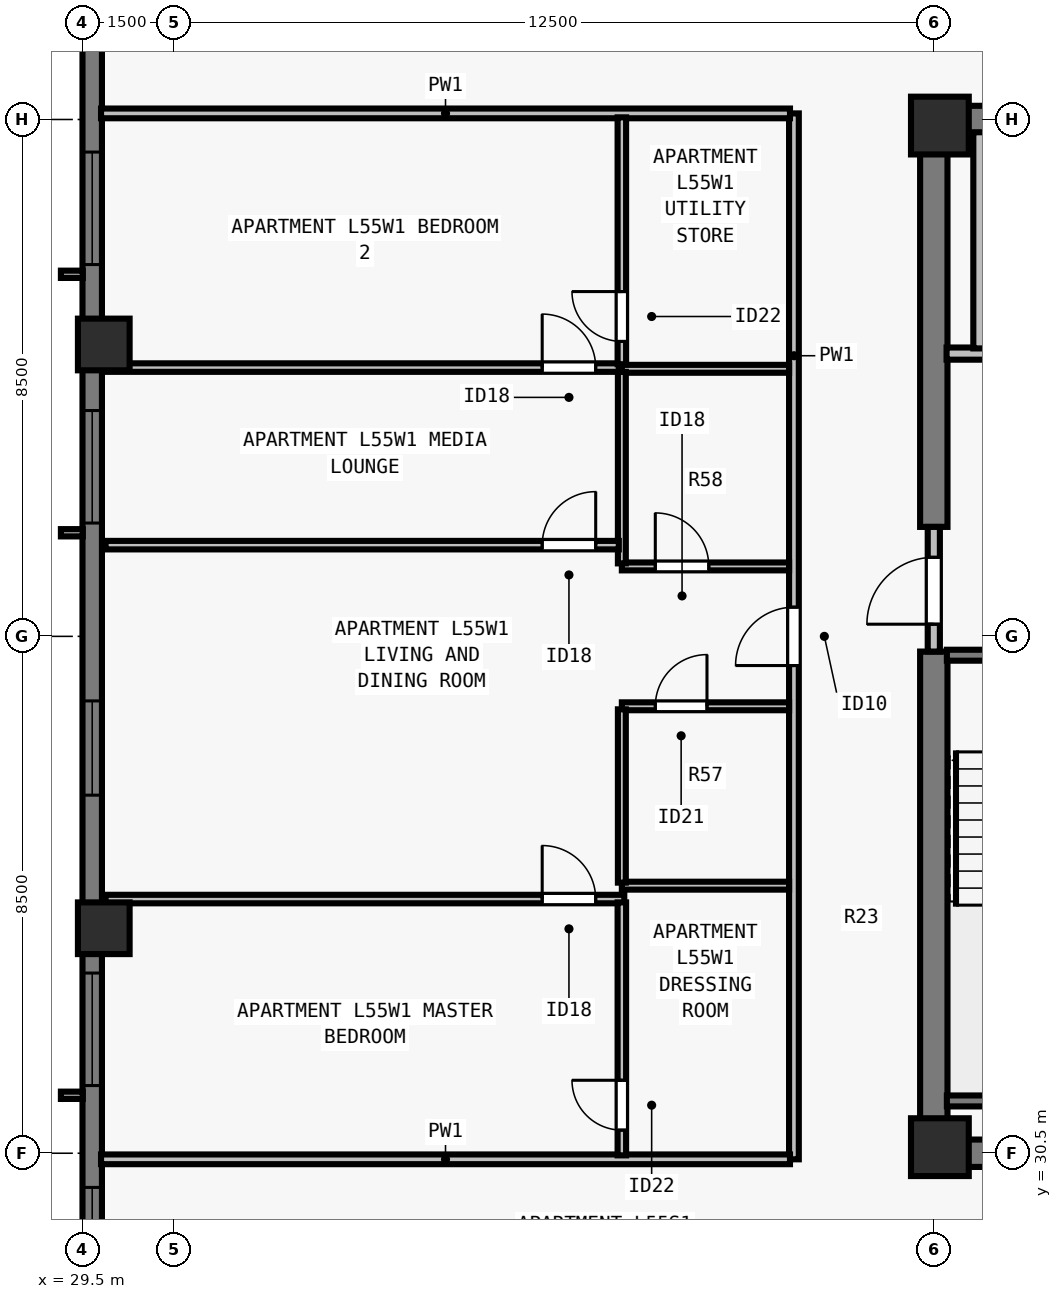
"""IFC4 building model, lengths in metres.
Left out: names, types, materials, properties, quantities, classifications, styles, units other than length and angle.
Written with IfcOpenShell. Run it as: python <this file> out.ifc"""

import sys

from ifc_helpers import new_model, si_unit, direction, frame, frame_2d, origin, origin_2d, place, context, subcontext, project, spatial, rectangle, extrude, element, fill, save


model = new_model("IFC4")
c1 = context("Model", 3, precision=1e-05, world=origin(), true_north=direction((0.0, 1.0)))
c2 = subcontext(c1, "Body", "Model", "MODEL_VIEW")
j1 = project(units=[si_unit("LENGTHUNIT", "METRE"), si_unit("PLANEANGLEUNIT", "RADIAN")], contexts=[c1])
p1 = place(None, origin())
s1 = spatial("IfcSite", under=j1, at=p1, CompositionType="ELEMENT")
p2 = place(p1, origin())
s2 = spatial("IfcBuilding", under=s1, at=p2, CompositionType="ELEMENT")
p3 = place(p2, frame((0.0, 0.0, 202.5)))
s3 = spatial("IfcBuildingStorey", under=s2, at=p3, CompositionType="ELEMENT", Elevation=202.5)
for number, where, z_axis, x_axis in (
    (1, (43.6, 30.6, 0.0), (0.0, 0.0, 1.0), (1.0, 0.0, 0.0)),
    (2, (43.6, 47.4, 0.0), (0.0, 0.0, 1.0), (1.0, 0.0, 0.0)),
):
    element("IfcColumn", number, at=place(p3, frame(where, z_axis=z_axis, x_axis=x_axis)), inside=s3, PredefinedType="COLUMN", context=c2, shape_type="SweptSolid", body=[
        extrude(rectangle(XDim=0.95, YDim=0.95, at=origin_2d()), origin(), (0.0, 0.0, 1.0), 3.5),
    ])
for number, where, z_axis, x_axis in (
    (3, (29.85, 43.8, 0.0), (0.0, 0.0, 1.0), (0.0, 1.0, 0.0)),
    (4, (29.85, 34.2, 0.0), (0.0, 0.0, 1.0), (0.0, 1.0, 0.0)),
):
    element("IfcColumn", number, at=place(p3, frame(where, z_axis=z_axis, x_axis=x_axis)), inside=s3, PredefinedType="COLUMN", context=c2, shape_type="SweptSolid", body=[
        extrude(rectangle(XDim=0.85, YDim=0.85, at=origin_2d()), origin(), (0.0, 0.0, 1.0), 3.5),
    ])
p4 = place(p3, frame((29.66, 21.5, 0.0), z_axis=(0.0, 0.0, 1.0), x_axis=(0.0, 1.0, 0.0)))
e5 = element("IfcWall", 5, at=p4, inside=s3, PredefinedType="SOLIDWALL", context=c2, shape_type="SweptSolid", body=[
    extrude(rectangle(XDim=34.702, YDim=0.32, at=frame_2d((17.351, 0.0))), origin(), (0.0, 0.0, 1.0), 3.29),
])
p5 = place(p4, frame((4.163, 0.0, 0.8)))
e6 = element("IfcOpeningElement", 6, at=p5, cuts=e5, PredefinedType="OPENING", context=c2, shape_type="SweptSolid", body=[
    extrude(rectangle(XDim=1.85, YDim=1.678, at=frame_2d((0.925, 0.839))), frame((0.0, 0.17, 0.0), z_axis=(0.0, -1.0, 0.0), x_axis=(1.0, 0.0, 0.0)), (0.0, 0.0, 1.0), 0.34),
])
p6 = place(p4, frame((6.888, 0.0, 0.8)))
e7 = element("IfcOpeningElement", 7, at=p6, cuts=e5, PredefinedType="OPENING", context=c2, shape_type="SweptSolid", body=[
    extrude(rectangle(XDim=1.55, YDim=1.678, at=frame_2d((0.775, 0.839))), frame((0.0, 0.17, 0.0), z_axis=(0.0, -1.0, 0.0), x_axis=(1.0, 0.0, 0.0)), (0.0, 0.0, 1.0), 0.34),
])
p7 = place(p4, frame((10.113, 0.0, 0.8)))
e8 = element("IfcOpeningElement", 8, at=p7, cuts=e5, PredefinedType="OPENING", context=c2, shape_type="SweptSolid", body=[
    extrude(rectangle(XDim=1.85, YDim=1.678, at=frame_2d((0.925, 0.839))), frame((0.0, 0.17, 0.0), z_axis=(0.0, -1.0, 0.0), x_axis=(1.0, 0.0, 0.0)), (0.0, 0.0, 1.0), 0.34),
])
p8 = place(p4, frame((14.888, 0.0, 0.8)))
e9 = element("IfcOpeningElement", 9, at=p8, cuts=e5, PredefinedType="OPENING", context=c2, shape_type="SweptSolid", body=[
    extrude(rectangle(XDim=1.55, YDim=1.678, at=frame_2d((0.775, 0.839))), frame((0.0, 0.17, 0.0), z_axis=(0.0, -1.0, 0.0), x_axis=(1.0, 0.0, 0.0)), (0.0, 0.0, 1.0), 0.34),
])
p9 = place(p4, frame((19.364, 0.0, 0.8)))
e10 = element("IfcOpeningElement", 10, at=p9, cuts=e5, PredefinedType="OPENING", context=c2, shape_type="SweptSolid", body=[
    extrude(rectangle(XDim=1.85, YDim=1.678, at=frame_2d((0.925, 0.839))), frame((0.0, 0.17, 0.0), z_axis=(0.0, -1.0, 0.0), x_axis=(1.0, 0.0, 0.0)), (0.0, 0.0, 1.0), 0.34),
])
p10 = place(p4, frame((23.614, 0.0, 0.8)))
e11 = element("IfcOpeningElement", 11, at=p10, cuts=e5, PredefinedType="OPENING", context=c2, shape_type="SweptSolid", body=[
    extrude(rectangle(XDim=1.85, YDim=1.678, at=frame_2d((0.925, 0.839))), frame((0.0, 0.17, 0.0), z_axis=(0.0, -1.0, 0.0), x_axis=(1.0, 0.0, 0.0)), (0.0, 0.0, 1.0), 0.34),
])
p11 = place(p4, frame((28.839, 0.0, 0.8)))
e12 = element("IfcOpeningElement", 12, at=p11, cuts=e5, PredefinedType="OPENING", context=c2, shape_type="SweptSolid", body=[
    extrude(rectangle(XDim=1.55, YDim=1.678, at=frame_2d((0.775, 0.839))), frame((0.0, 0.17, 0.0), z_axis=(0.0, -1.0, 0.0), x_axis=(1.0, 0.0, 0.0)), (0.0, 0.0, 1.0), 0.34),
])
for number, where, z_axis, x_axis in (
    (13, (43.275, 30.5, 0.0), (0.0, 0.0, 1.0), (1.0, 0.0, 0.0)),
    (14, (43.275, 47.5, 0.0), (0.0, 0.0, 1.0), (1.0, 0.0, 0.0)),
):
    element("IfcWall", number, at=place(p3, frame(where, z_axis=z_axis, x_axis=x_axis)), inside=s3, PredefinedType="SHEAR", context=c2, shape_type="SweptSolid", body=[
        extrude(rectangle(XDim=17.45, YDim=0.45, at=frame_2d((8.725, 0.0))), origin(), (0.0, 0.0, 1.0), 3.29),
    ])
p12 = place(p3, frame((43.5, 30.715, 0.0), z_axis=(0.0, 0.0, 1.0), x_axis=(0.0, 1.0, 0.0)))
e15 = element("IfcWall", 15, at=p12, inside=s3, PredefinedType="SHEAR", context=c2, shape_type="SweptSolid", body=[
    extrude(rectangle(XDim=8.035, YDim=0.45, at=frame_2d((4.018, 0.0))), origin(), (0.0, 0.0, 1.0), 3.29),
])
p13 = place(p3, frame((43.5, 40.8, 0.0), z_axis=(0.0, 0.0, 1.0), x_axis=(0.0, 1.0, 0.0)))
e16 = element("IfcWall", 16, at=p13, inside=s3, PredefinedType="SHEAR", context=c2, shape_type="SweptSolid", body=[
    extrude(rectangle(XDim=6.485, YDim=0.45, at=frame_2d((3.242, 0.0))), origin(), (0.0, 0.0, 1.0), 3.29),
])
p14 = place(p3, frame((43.5, 38.75, 0.0), z_axis=(0.0, 0.0, 1.0), x_axis=(0.0, 1.0, 0.0)))
e17 = element("IfcWall", 17, at=p14, inside=s3, PredefinedType="SOLIDWALL", context=c2, shape_type="SweptSolid", body=[
    extrude(rectangle(XDim=2.05, YDim=0.2, at=frame_2d((1.025, 0.0))), origin(), (0.0, 0.0, 1.0), 3.29),
])
p15 = place(p14, frame((0.45, 0.0, 0.0)))
e18 = element("IfcOpeningElement", 18, at=p15, cuts=e17, PredefinedType="OPENING", context=c2, shape_type="SweptSolid", body=[
    extrude(rectangle(XDim=1.1, YDim=2.15, at=frame_2d((0.55, 1.075))), frame((0.0, 0.11, 0.0), z_axis=(0.0, -1.0, 0.0), x_axis=(1.0, 0.0, 0.0)), (0.0, 0.0, 1.0), 0.22),
])
p16 = place(p3, frame((43.71, 43.65, 0.0), z_axis=(0.0, 0.0, 1.0), x_axis=(1.0, 0.0, 0.0)))
e19 = element("IfcWall", 19, at=p16, inside=s3, PredefinedType="SOLIDWALL", context=c2, shape_type="SweptSolid", body=[
    extrude(rectangle(XDim=3.555, YDim=0.2, at=frame_2d((1.777, 0.0))), origin(), (0.0, 0.0, 1.0), 3.29),
])
p17 = place(p16, frame((1.16, 0.0, 0.0)))
e20 = element("IfcOpeningElement", 20, at=p17, cuts=e19, PredefinedType="OPENING", context=c2, shape_type="SweptSolid", body=[
    extrude(rectangle(XDim=1.1, YDim=2.2, at=frame_2d((0.55, 1.1))), frame((0.0, 0.11, 0.0), z_axis=(0.0, -1.0, 0.0), x_axis=(1.0, 0.0, 0.0)), (0.0, 0.0, 1.0), 0.22),
])
p18 = place(p3, frame((44.25, 43.735, 0.0), z_axis=(0.0, 0.0, 1.0), x_axis=(0.0, 1.0, 0.0)))
e21 = element("IfcWall", 21, at=p18, inside=s3, PredefinedType="SOLIDWALL", context=c2, shape_type="SweptSolid", body=[
    extrude(rectangle(XDim=3.555, YDim=0.2, at=frame_2d((1.777, 0.0))), origin(), (0.0, 0.0, 1.0), 3.29),
])
p19 = place(p3, frame((41.2, 30.4, 0.0), z_axis=(0.0, 0.0, 1.0), x_axis=(0.0, 1.0, 0.0)))
e22 = element("IfcWall", 22, at=p19, inside=s3, PredefinedType="PARTITIONING", context=c2, shape_type="SweptSolid", body=[
    extrude(rectangle(XDim=17.2, YDim=0.16, at=frame_2d((8.6, 0.0))), origin(), (0.0, 0.0, 1.0), 3.29),
])
p20 = place(p19, frame((8.12, 0.0, 0.0)))
e23 = element("IfcOpeningElement", 23, at=p20, cuts=e22, PredefinedType="OPENING", context=c2, shape_type="SweptSolid", body=[
    extrude(rectangle(XDim=0.96, YDim=2.18, at=frame_2d((0.48, 1.09))), frame((0.0, 0.09, 0.0), z_axis=(0.0, -1.0, 0.0), x_axis=(1.0, 0.0, 0.0)), (0.0, 0.0, 1.0), 0.18),
])
for number, where, z_axis, x_axis in (
    (24, (29.805, 30.4, 0.0), (0.0, 0.0, 1.0), (1.0, 0.0, 0.0)),
    (25, (29.805, 47.6, 0.0), (0.0, 0.0, 1.0), (1.0, 0.0, 0.0)),
):
    element("IfcWall", number, at=place(p3, frame(where, z_axis=z_axis, x_axis=x_axis)), inside=s3, PredefinedType="PARTITIONING", context=c2, shape_type="SweptSolid", body=[
        extrude(rectangle(XDim=11.33, YDim=0.16, at=frame_2d((5.665, 0.0))), origin(), (0.0, 0.0, 1.0), 3.29),
    ])
p21 = place(p3, frame((38.37, 34.9, 0.0), z_axis=(0.0, 0.0, 1.0), x_axis=(1.0, 0.0, 0.0)))
e26 = element("IfcWall", 26, at=p21, inside=s3, PredefinedType="PLUMBINGWALL", context=c2, shape_type="SweptSolid", body=[
    extrude(rectangle(XDim=2.75, YDim=0.13, at=frame_2d((1.375, 0.0))), origin(), (0.0, 0.0, 1.0), 3.29),
])
p22 = place(p3, frame((38.37, 37.85, 0.0), z_axis=(0.0, 0.0, 1.0), x_axis=(1.0, 0.0, 0.0)))
e27 = element("IfcWall", 27, at=p22, inside=s3, PredefinedType="PLUMBINGWALL", context=c2, shape_type="SweptSolid", body=[
    extrude(rectangle(XDim=2.75, YDim=0.13, at=frame_2d((1.375, 0.0))), origin(), (0.0, 0.0, 1.0), 3.29),
])
p23 = place(p22, frame((0.55, 0.0, 0.0)))
e28 = element("IfcOpeningElement", 28, at=p23, cuts=e27, PredefinedType="OPENING", context=c2, shape_type="SweptSolid", body=[
    extrude(rectangle(XDim=0.85, YDim=2.08, at=frame_2d((0.425, 1.04))), frame((0.0, 0.075, 0.0), z_axis=(0.0, -1.0, 0.0), x_axis=(1.0, 0.0, 0.0)), (0.0, 0.0, 1.0), 0.15),
])
p24 = place(p3, frame((38.37, 34.95, 0.0), z_axis=(0.0, 0.0, 1.0), x_axis=(0.0, 1.0, 0.0)))
e29 = element("IfcWall", 29, at=p24, inside=s3, PredefinedType="PLUMBINGWALL", context=c2, shape_type="SweptSolid", body=[
    extrude(rectangle(XDim=2.85, YDim=0.13, at=frame_2d((1.425, 0.0))), origin(), (0.0, 0.0, 1.0), 3.29),
])
p25 = place(p3, frame((38.37, 43.4, 0.0), z_axis=(0.0, 0.0, 1.0), x_axis=(1.0, 0.0, 0.0)))
e30 = element("IfcWall", 30, at=p25, inside=s3, PredefinedType="PLUMBINGWALL", context=c2, shape_type="SweptSolid", body=[
    extrude(rectangle(XDim=2.75, YDim=0.13, at=frame_2d((1.375, 0.0))), origin(), (0.0, 0.0, 1.0), 2.958),
])
p26 = place(p3, frame((38.37, 40.15, 0.0), z_axis=(0.0, 0.0, 1.0), x_axis=(1.0, 0.0, 0.0)))
e31 = element("IfcWall", 31, at=p26, inside=s3, PredefinedType="PLUMBINGWALL", context=c2, shape_type="SweptSolid", body=[
    extrude(rectangle(XDim=2.75, YDim=0.13, at=frame_2d((1.375, 0.0))), origin(), (0.0, 0.0, 1.0), 3.29),
])
p27 = place(p26, frame((0.55, 0.0, 0.0)))
e32 = element("IfcOpeningElement", 32, at=p27, cuts=e31, PredefinedType="OPENING", context=c2, shape_type="SweptSolid", body=[
    extrude(rectangle(XDim=0.88, YDim=2.1, at=frame_2d((0.44, 1.05))), frame((0.0, 0.075, 0.0), z_axis=(0.0, -1.0, 0.0), x_axis=(1.0, 0.0, 0.0)), (0.0, 0.0, 1.0), 0.15),
])
p28 = place(p3, frame((38.37, 40.2, 0.0), z_axis=(0.0, 0.0, 1.0), x_axis=(0.0, 1.0, 0.0)))
e33 = element("IfcWall", 33, at=p28, inside=s3, PredefinedType="PLUMBINGWALL", context=c2, shape_type="SweptSolid", body=[
    extrude(rectangle(XDim=3.15, YDim=0.13, at=frame_2d((1.575, 0.0))), origin(), (0.0, 0.0, 1.0), 3.29),
])
p29 = place(p3, frame((29.88, 34.68, 0.0), z_axis=(0.0, 0.0, 1.0), x_axis=(1.0, 0.0, 0.0)))
e34 = element("IfcWall", 34, at=p29, inside=s3, PredefinedType="PARTITIONING", context=c2, shape_type="SweptSolid", body=[
    extrude(rectangle(XDim=8.53, YDim=0.14, at=frame_2d((4.265, 0.0))), origin(), (0.0, 0.0, 1.0), 2.958),
])
p30 = place(p29, frame((7.18, 0.0, 0.0)))
e35 = element("IfcOpeningElement", 35, at=p30, cuts=e34, PredefinedType="OPENING", context=c2, shape_type="SweptSolid", body=[
    extrude(rectangle(XDim=0.88, YDim=2.1, at=frame_2d((0.44, 1.05))), frame((0.0, 0.08, 0.0), z_axis=(0.0, -1.0, 0.0), x_axis=(1.0, 0.0, 0.0)), (0.0, 0.0, 1.0), 0.16),
])
p31 = place(p3, frame((38.37, 30.465, 0.0), z_axis=(0.0, 0.0, 1.0), x_axis=(0.0, 1.0, 0.0)))
e36 = element("IfcWall", 36, at=p31, inside=s3, PredefinedType="PARTITIONING", context=c2, shape_type="SweptSolid", body=[
    extrude(rectangle(XDim=4.16, YDim=0.14, at=frame_2d((2.08, 0.0))), origin(), (0.0, 0.0, 1.0), 3.29),
])
p32 = place(p31, frame((0.415, 0.0, 0.0)))
e37 = element("IfcOpeningElement", 37, at=p32, cuts=e36, PredefinedType="OPENING", context=c2, shape_type="SweptSolid", body=[
    extrude(rectangle(XDim=0.82, YDim=2.1, at=frame_2d((0.41, 1.05))), frame((0.0, 0.08, 0.0), z_axis=(0.0, -1.0, 0.0), x_axis=(1.0, 0.0, 0.0)), (0.0, 0.0, 1.0), 0.16),
])
p33 = place(p3, frame((29.88, 43.42, 0.0), z_axis=(0.0, 0.0, 1.0), x_axis=(1.0, 0.0, 0.0)))
e38 = element("IfcWall", 38, at=p33, inside=s3, PredefinedType="PARTITIONING", context=c2, shape_type="SweptSolid", body=[
    extrude(rectangle(XDim=8.44, YDim=0.14, at=frame_2d((4.22, 0.0))), origin(), (0.0, 0.0, 1.0), 3.29),
])
p34 = place(p33, frame((7.18, 0.0, 0.0)))
e39 = element("IfcOpeningElement", 39, at=p34, cuts=e38, PredefinedType="OPENING", context=c2, shape_type="SweptSolid", body=[
    extrude(rectangle(XDim=0.88, YDim=2.1, at=frame_2d((0.44, 1.05))), frame((0.0, 0.08, 0.0), z_axis=(0.0, -1.0, 0.0), x_axis=(1.0, 0.0, 0.0)), (0.0, 0.0, 1.0), 0.16),
])
p35 = place(p3, frame((38.37, 43.475, 0.0), z_axis=(0.0, 0.0, 1.0), x_axis=(0.0, 1.0, 0.0)))
e40 = element("IfcWall", 40, at=p35, inside=s3, PredefinedType="PARTITIONING", context=c2, shape_type="SweptSolid", body=[
    extrude(rectangle(XDim=4.06, YDim=0.14, at=frame_2d((2.03, 0.0))), origin(), (0.0, 0.0, 1.0), 3.29),
])
p36 = place(p35, frame((0.375, 0.0, 0.0)))
e41 = element("IfcOpeningElement", 41, at=p36, cuts=e40, PredefinedType="OPENING", context=c2, shape_type="SweptSolid", body=[
    extrude(rectangle(XDim=0.82, YDim=2.1, at=frame_2d((0.41, 1.05))), frame((0.0, 0.08, 0.0), z_axis=(0.0, -1.0, 0.0), x_axis=(1.0, 0.0, 0.0)), (0.0, 0.0, 1.0), 0.16),
])
p37 = place(p3, frame((29.88, 40.5, 0.0), z_axis=(0.0, 0.0, 1.0), x_axis=(1.0, 0.0, 0.0)))
e42 = element("IfcWall", 42, at=p37, inside=s3, PredefinedType="PARTITIONING", context=c2, shape_type="SweptSolid", body=[
    extrude(rectangle(XDim=8.44, YDim=0.14, at=frame_2d((4.22, 0.0))), origin(), (0.0, 0.0, 1.0), 2.958),
])
p38 = place(p37, frame((7.18, 0.0, 0.0)))
e43 = element("IfcOpeningElement", 43, at=p38, cuts=e42, PredefinedType="OPENING", context=c2, shape_type="SweptSolid", body=[
    extrude(rectangle(XDim=0.88, YDim=2.1, at=frame_2d((0.44, 1.05))), frame((0.0, 0.08, 0.0), z_axis=(0.0, -1.0, 0.0), x_axis=(1.0, 0.0, 0.0)), (0.0, 0.0, 1.0), 0.16),
])
p39 = place(p3, frame((43.715, 38.69, 0.0), z_axis=(0.0, 0.0, 1.0), x_axis=(1.0, 0.0, 0.0)))
e44 = element("IfcWall", 44, at=p39, inside=s3, PredefinedType="SOLIDWALL", context=c2, shape_type="SweptSolid", body=[
    extrude(rectangle(XDim=3.28, YDim=0.18, at=frame_2d((1.64, 0.0))), origin(), (0.0, 0.0, 1.0), 3.29),
])
p40 = place(p39, frame((1.165, 0.0, 0.0)))
e45 = element("IfcOpeningElement", 45, at=p40, cuts=e44, PredefinedType="OPENING", context=c2, shape_type="SweptSolid", body=[
    extrude(rectangle(XDim=0.95, YDim=2.15, at=frame_2d((0.475, 1.075))), frame((0.0, 0.1, 0.0), z_axis=(0.0, -1.0, 0.0), x_axis=(1.0, 0.0, 0.0)), (0.0, 0.0, 1.0), 0.2),
])
p41 = place(p3, frame((43.715, 31.36, 0.0), z_axis=(0.0, 0.0, 1.0), x_axis=(1.0, 0.0, 0.0)))
e46 = element("IfcWall", 46, at=p41, inside=s3, PredefinedType="SOLIDWALL", context=c2, shape_type="SweptSolid", body=[
    extrude(rectangle(XDim=3.28, YDim=0.18, at=frame_2d((1.64, 0.0))), origin(), (0.0, 0.0, 1.0), 3.29),
])
p42 = place(p6, origin())
e47 = element("IfcWindow", 47, at=p42, inside=s3, PartitioningType="SINGLE_PANEL", PredefinedType="WINDOW", context=c2, shape_type="SweptSolid", body=[
    extrude(rectangle(XDim=1.55, YDim=1.678, at=frame_2d((0.775, 0.839))), frame((0.0, -0.05, 0.0), z_axis=(0.0, -1.0, 0.0), x_axis=(1.0, 0.0, 0.0)), (0.0, 0.0, 1.0), 0.06),
])
fill(e7, e47)
p43 = place(p7, origin())
e48 = element("IfcWindow", 48, at=p43, inside=s3, PartitioningType="SINGLE_PANEL", PredefinedType="WINDOW", context=c2, shape_type="SweptSolid", body=[
    extrude(rectangle(XDim=1.85, YDim=1.678, at=frame_2d((0.925, 0.839))), frame((0.0, -0.05, 0.0), z_axis=(0.0, -1.0, 0.0), x_axis=(1.0, 0.0, 0.0)), (0.0, 0.0, 1.0), 0.06),
])
fill(e8, e48)
p44 = place(p8, origin())
e49 = element("IfcWindow", 49, at=p44, inside=s3, PartitioningType="SINGLE_PANEL", PredefinedType="WINDOW", context=c2, shape_type="SweptSolid", body=[
    extrude(rectangle(XDim=1.55, YDim=1.678, at=frame_2d((0.775, 0.839))), frame((0.0, -0.05, 0.0), z_axis=(0.0, -1.0, 0.0), x_axis=(1.0, 0.0, 0.0)), (0.0, 0.0, 1.0), 0.06),
])
fill(e9, e49)
p45 = place(p9, origin())
e50 = element("IfcWindow", 50, at=p45, inside=s3, PartitioningType="SINGLE_PANEL", PredefinedType="WINDOW", context=c2, shape_type="SweptSolid", body=[
    extrude(rectangle(XDim=1.85, YDim=1.678, at=frame_2d((0.925, 0.839))), frame((0.0, -0.05, 0.0), z_axis=(0.0, -1.0, 0.0), x_axis=(1.0, 0.0, 0.0)), (0.0, 0.0, 1.0), 0.06),
])
fill(e10, e50)
p46 = place(p10, origin())
e51 = element("IfcWindow", 51, at=p46, inside=s3, PartitioningType="SINGLE_PANEL", PredefinedType="WINDOW", context=c2, shape_type="SweptSolid", body=[
    extrude(rectangle(XDim=1.85, YDim=1.678, at=frame_2d((0.925, 0.839))), frame((0.0, -0.05, 0.0), z_axis=(0.0, -1.0, 0.0), x_axis=(1.0, 0.0, 0.0)), (0.0, 0.0, 1.0), 0.06),
])
fill(e11, e51)
p47 = place(p15, origin())
e52 = element("IfcDoor", 52, at=p47, inside=s3, OperationType="SINGLE_SWING_LEFT", PredefinedType="DOOR", context=c2, shape_type="SweptSolid", body=[
    extrude(rectangle(XDim=1.1, YDim=2.15, at=frame_2d((0.55, 1.075))), frame((0.0, 0.025, 0.0), z_axis=(0.0, -1.0, 0.0), x_axis=(1.0, 0.0, 0.0)), (0.0, 0.0, 1.0), 0.05),
])
fill(e18, e52)
p48 = place(p23, origin())
e53 = element("IfcDoor", 53, at=p48, inside=s3, OperationType="SINGLE_SWING_RIGHT", PredefinedType="DOOR", context=c2, shape_type="SweptSolid", body=[
    extrude(rectangle(XDim=0.85, YDim=2.08, at=frame_2d((0.425, 1.04))), frame((0.0, 0.025, 0.0), z_axis=(0.0, -1.0, 0.0), x_axis=(1.0, 0.0, 0.0)), (0.0, 0.0, 1.0), 0.05),
])
fill(e28, e53)
p49 = place(p27, origin())
e54 = element("IfcDoor", 54, at=p49, inside=s3, OperationType="SINGLE_SWING_LEFT", PredefinedType="DOOR", context=c2, shape_type="SweptSolid", body=[
    extrude(rectangle(XDim=0.88, YDim=2.1, at=frame_2d((0.44, 1.05))), frame((0.0, 0.025, 0.0), z_axis=(0.0, -1.0, 0.0), x_axis=(1.0, 0.0, 0.0)), (0.0, 0.0, 1.0), 0.05),
])
fill(e32, e54)
p50 = place(p32, origin())
e55 = element("IfcDoor", 55, at=p50, inside=s3, OperationType="SINGLE_SWING_RIGHT", PredefinedType="DOOR", context=c2, shape_type="SweptSolid", body=[
    extrude(rectangle(XDim=0.82, YDim=2.1, at=frame_2d((0.41, 1.05))), frame((0.0, 0.025, 0.0), z_axis=(0.0, -1.0, 0.0), x_axis=(1.0, 0.0, 0.0)), (0.0, 0.0, 1.0), 0.05),
])
fill(e37, e55)
p51 = place(p30, origin())
e56 = element("IfcDoor", 56, at=p51, inside=s3, OperationType="SINGLE_SWING_LEFT", PredefinedType="DOOR", context=c2, shape_type="SweptSolid", body=[
    extrude(rectangle(XDim=0.88, YDim=2.1, at=frame_2d((0.44, 1.05))), frame((0.0, 0.025, 0.0), z_axis=(0.0, -1.0, 0.0), x_axis=(1.0, 0.0, 0.0)), (0.0, 0.0, 1.0), 0.05),
])
fill(e35, e56)
p52 = place(p36, origin())
e57 = element("IfcDoor", 57, at=p52, inside=s3, OperationType="SINGLE_SWING_RIGHT", PredefinedType="DOOR", context=c2, shape_type="SweptSolid", body=[
    extrude(rectangle(XDim=0.82, YDim=2.1, at=frame_2d((0.41, 1.05))), frame((0.0, 0.025, 0.0), z_axis=(0.0, -1.0, 0.0), x_axis=(1.0, 0.0, 0.0)), (0.0, 0.0, 1.0), 0.05),
])
fill(e41, e57)
p53 = place(p34, origin())
e58 = element("IfcDoor", 58, at=p53, inside=s3, OperationType="SINGLE_SWING_LEFT", PredefinedType="DOOR", context=c2, shape_type="SweptSolid", body=[
    extrude(rectangle(XDim=0.88, YDim=2.1, at=frame_2d((0.44, 1.05))), frame((0.0, 0.025, 0.0), z_axis=(0.0, -1.0, 0.0), x_axis=(1.0, 0.0, 0.0)), (0.0, 0.0, 1.0), 0.05),
])
fill(e39, e58)
p54 = place(p38, origin())
e59 = element("IfcDoor", 59, at=p54, inside=s3, OperationType="SINGLE_SWING_RIGHT", PredefinedType="DOOR", context=c2, shape_type="SweptSolid", body=[
    extrude(rectangle(XDim=0.88, YDim=2.1, at=frame_2d((0.44, 1.05))), frame((0.0, 0.025, 0.0), z_axis=(0.0, -1.0, 0.0), x_axis=(1.0, 0.0, 0.0)), (0.0, 0.0, 1.0), 0.05),
])
fill(e43, e59)
p55 = place(p20, origin())
e60 = element("IfcDoor", 60, at=p55, inside=s3, OperationType="SINGLE_SWING_LEFT", PredefinedType="DOOR", context=c2, shape_type="SweptSolid", body=[
    extrude(rectangle(XDim=0.96, YDim=2.18, at=frame_2d((0.48, 1.09))), frame((0.0, 0.025, 0.0), z_axis=(0.0, -1.0, 0.0), x_axis=(1.0, 0.0, 0.0)), (0.0, 0.0, 1.0), 0.05),
])
fill(e23, e60)
save(model, sys.argv[1])
